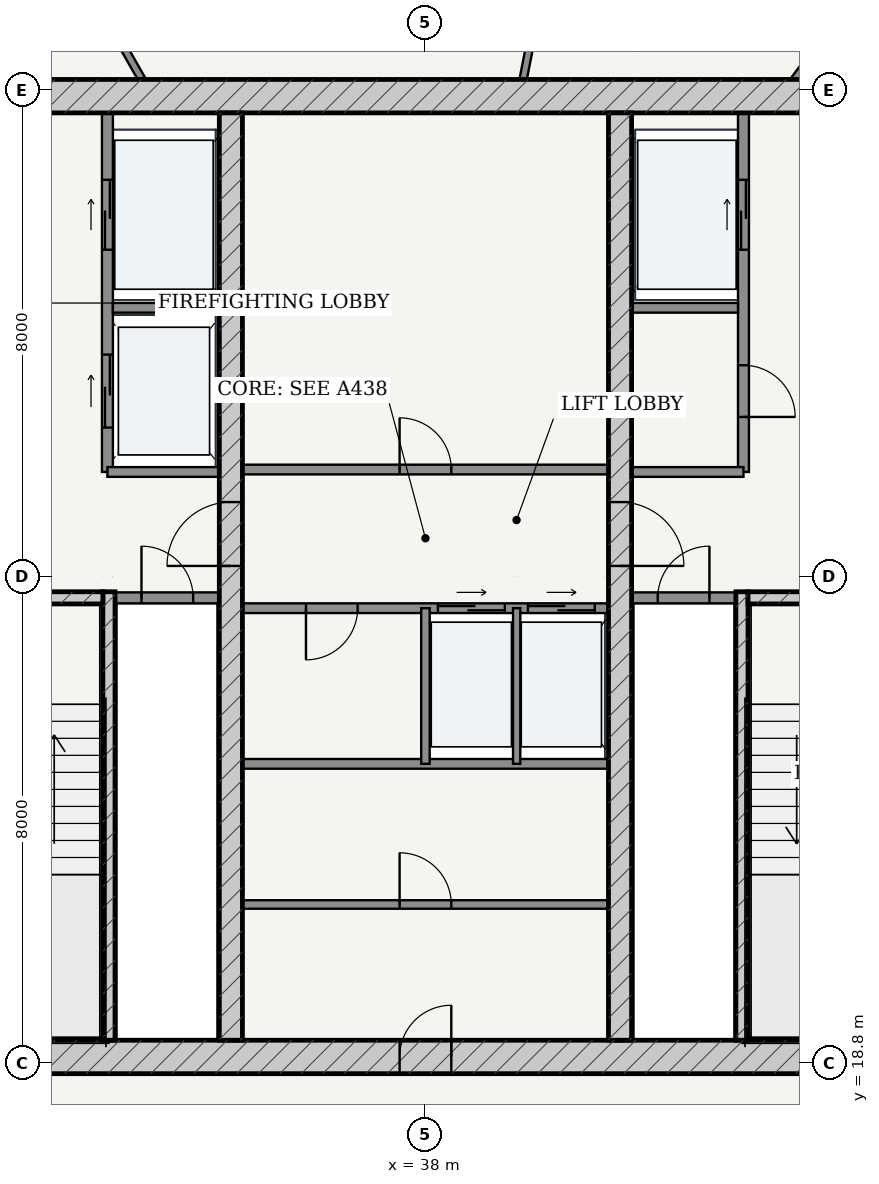
"""IFC4 building model, lengths in metres.
Left out: names, types, materials, properties, quantities, classifications, styles, units other than length and angle.
Written with IfcOpenShell. Run it as: python <this file> out.ifc"""

import sys

from ifc_helpers import new_model, si_unit, direction, frame, frame_2d, origin, place, context, subcontext, project, spatial, rectangle, extrude, source, transform, mapped, element, fill, save


model = new_model("IFC4")
c1 = context("Model", 3, precision=1e-05, world=origin(), true_north=direction((-0.2419218956, 0.970295726276)))
c2 = subcontext(c1, "Body", "Model", "MODEL_VIEW")
j1 = project(units=[si_unit("LENGTHUNIT", "METRE"), si_unit("PLANEANGLEUNIT", "RADIAN")], contexts=[c1])
p1 = place(None, origin())
s1 = spatial("IfcSite", under=j1, at=p1, CompositionType="ELEMENT")
p2 = place(p1, origin())
s2 = spatial("IfcBuilding", under=s1, at=p2, CompositionType="ELEMENT")
p3 = place(p2, frame((0.0, 0.0, 293.2)))
s3 = spatial("IfcBuildingStorey", under=s2, at=p3, CompositionType="ELEMENT", Elevation=293.2)
p4 = place(p3, frame((28.825, 18.9, 0.0), z_axis=(0.0, 0.0, 1.0), x_axis=(1.0, 0.0, 0.0)))
e1 = element("IfcWall", 1, at=p4, inside=s3, PredefinedType="SHEAR", context=c2, shape_type="SweptSolid", body=[
    extrude(rectangle(XDim=18.35, YDim=0.55, at=frame_2d((9.175, 0.0))), origin(), (0.0, 0.0, 1.0), 3.49),
])
p5 = place(p4, frame((8.75, 0.0, 0.0)))
e2 = element("IfcOpeningElement", 2, at=p5, cuts=e1, PredefinedType="OPENING", context=c2, shape_type="SweptSolid", body=[
    extrude(rectangle(XDim=0.85, YDim=2.1, at=frame_2d((0.425, 1.05))), frame((0.0, 0.285, 0.0), z_axis=(0.0, -1.0, 0.0), x_axis=(1.0, 0.0, 0.0)), (0.0, 0.0, 1.0), 0.57),
])
p6 = place(p3, frame((28.825, 34.7, 0.0), z_axis=(0.0, 0.0, 1.0), x_axis=(1.0, 0.0, 0.0)))
e3 = element("IfcWall", 3, at=p6, inside=s3, PredefinedType="SHEAR", context=c2, shape_type="SweptSolid", body=[
    extrude(rectangle(XDim=18.35, YDim=0.55, at=frame_2d((9.175, 0.0))), origin(), (0.0, 0.0, 1.0), 3.49),
])
p7 = place(p3, frame((32.795, 19.175, 0.0), z_axis=(0.0, 0.0, 1.0), x_axis=(0.0, 1.0, 0.0)))
e4 = element("IfcWall", 4, at=p7, inside=s3, PredefinedType="SOLIDWALL", context=c2, shape_type="SweptSolid", body=[
    extrude(rectangle(XDim=7.375, YDim=0.2, at=frame_2d((3.688, 0.0))), origin(), (0.0, 0.0, 1.0), 3.49),
])
p8 = place(p3, frame((29.375, 26.45, 0.0), z_axis=(0.0, 0.0, 1.0), x_axis=(1.0, 0.0, 0.0)))
e5 = element("IfcWall", 5, at=p8, inside=s3, PredefinedType="SOLIDWALL", context=c2, shape_type="SweptSolid", body=[
    extrude(rectangle(XDim=3.32, YDim=0.2, at=frame_2d((1.66, 0.0))), origin(), (0.0, 0.0, 1.0), 3.49),
])
p9 = place(p8, frame((1.185, 0.0, 0.0)))
e6 = element("IfcOpeningElement", 6, at=p9, cuts=e5, PredefinedType="OPENING", context=c2, shape_type="SweptSolid", body=[
    extrude(rectangle(XDim=0.95, YDim=2.15, at=frame_2d((0.475, 1.075))), frame((0.0, 0.11, 0.0), z_axis=(0.0, -1.0, 0.0), x_axis=(1.0, 0.0, 0.0)), (0.0, 0.0, 1.0), 0.22),
])
p10 = place(p3, frame((43.205, 19.175, 0.0), z_axis=(0.0, 0.0, 1.0), x_axis=(0.0, 1.0, 0.0)))
e7 = element("IfcWall", 7, at=p10, inside=s3, PredefinedType="SOLIDWALL", context=c2, shape_type="SweptSolid", body=[
    extrude(rectangle(XDim=7.375, YDim=0.2, at=frame_2d((3.688, 0.0))), origin(), (0.0, 0.0, 1.0), 3.49),
])
p11 = place(p3, frame((43.305, 26.45, 0.0), z_axis=(0.0, 0.0, 1.0), x_axis=(1.0, 0.0, 0.0)))
e8 = element("IfcWall", 8, at=p11, inside=s3, PredefinedType="SOLIDWALL", context=c2, shape_type="SweptSolid", body=[
    extrude(rectangle(XDim=3.32, YDim=0.2, at=frame_2d((1.66, 0.0))), origin(), (0.0, 0.0, 1.0), 3.49),
])
p12 = place(p11, frame((1.185, 0.0, 0.0)))
e9 = element("IfcOpeningElement", 9, at=p12, cuts=e8, PredefinedType="OPENING", context=c2, shape_type="SweptSolid", body=[
    extrude(rectangle(XDim=0.95, YDim=2.15, at=frame_2d((0.475, 1.075))), frame((0.0, 0.11, 0.0), z_axis=(0.0, -1.0, 0.0), x_axis=(1.0, 0.0, 0.0)), (0.0, 0.0, 1.0), 0.22),
])
p13 = place(p3, frame((34.8, 19.175, 0.0), z_axis=(0.0, 0.0, 1.0), x_axis=(0.0, 1.0, 0.0)))
e10 = element("IfcWall", 10, at=p13, inside=s3, PredefinedType="SHEAR", context=c2, shape_type="SweptSolid", body=[
    extrude(rectangle(XDim=15.25, YDim=0.38, at=frame_2d((7.625, 0.0))), origin(), (0.0, 0.0, 1.0), 3.49),
])
p14 = place(p13, frame((7.8, 0.0, 0.0)))
e11 = element("IfcOpeningElement", 11, at=p14, cuts=e10, PredefinedType="OPENING", context=c2, shape_type="SweptSolid", body=[
    extrude(rectangle(XDim=1.05, YDim=2.15, at=frame_2d((0.525, 1.075))), frame((0.0, 0.2, 0.0), z_axis=(0.0, -1.0, 0.0), x_axis=(1.0, 0.0, 0.0)), (0.0, 0.0, 1.0), 0.4),
])
p15 = place(p3, frame((41.2, 19.175, 0.0), z_axis=(0.0, 0.0, 1.0), x_axis=(0.0, 1.0, 0.0)))
e12 = element("IfcWall", 12, at=p15, inside=s3, PredefinedType="SHEAR", context=c2, shape_type="SweptSolid", body=[
    extrude(rectangle(XDim=15.25, YDim=0.38, at=frame_2d((7.625, 0.0))), origin(), (0.0, 0.0, 1.0), 3.49),
])
p16 = place(p15, frame((7.8, 0.0, 0.0)))
e13 = element("IfcOpeningElement", 13, at=p16, cuts=e12, PredefinedType="OPENING", context=c2, shape_type="SweptSolid", body=[
    extrude(rectangle(XDim=1.05, YDim=2.15, at=frame_2d((0.525, 1.075))), frame((0.0, 0.2, 0.0), z_axis=(0.0, -1.0, 0.0), x_axis=(1.0, 0.0, 0.0)), (0.0, 0.0, 1.0), 0.4),
])
p17 = place(p3, frame((32.9, 26.45, 0.0), z_axis=(0.0, 0.0, 1.0), x_axis=(1.0, 0.0, 0.0)))
e14 = element("IfcWall", 14, at=p17, inside=s3, PredefinedType="PARTITIONING", context=c2, shape_type="SweptSolid", body=[
    extrude(rectangle(XDim=1.71, YDim=0.18, at=frame_2d((0.855, 0.0))), origin(), (0.0, 0.0, 1.0), 3.49),
])
p18 = place(p17, frame((0.43, 0.0, 0.0)))
e15 = element("IfcOpeningElement", 15, at=p18, cuts=e14, PredefinedType="OPENING", context=c2, shape_type="SweptSolid", body=[
    extrude(rectangle(XDim=0.85, YDim=2.1, at=frame_2d((0.425, 1.05))), frame((0.0, 0.1, 0.0), z_axis=(0.0, -1.0, 0.0), x_axis=(1.0, 0.0, 0.0)), (0.0, 0.0, 1.0), 0.2),
])
p19 = place(p3, frame((41.39, 26.45, 0.0), z_axis=(0.0, 0.0, 1.0), x_axis=(1.0, 0.0, 0.0)))
e16 = element("IfcWall", 16, at=p19, inside=s3, PredefinedType="PARTITIONING", context=c2, shape_type="SweptSolid", body=[
    extrude(rectangle(XDim=1.71, YDim=0.18, at=frame_2d((0.855, 0.0))), origin(), (0.0, 0.0, 1.0), 3.49),
])
p20 = place(p19, frame((0.43, 0.0, 0.0)))
e17 = element("IfcOpeningElement", 17, at=p20, cuts=e16, PredefinedType="OPENING", context=c2, shape_type="SweptSolid", body=[
    extrude(rectangle(XDim=0.85, YDim=2.1, at=frame_2d((0.425, 1.05))), frame((0.0, 0.1, 0.0), z_axis=(0.0, -1.0, 0.0), x_axis=(1.0, 0.0, 0.0)), (0.0, 0.0, 1.0), 0.2),
])
p21 = place(p3, frame((32.77, 28.52, 0.0), z_axis=(0.0, 0.0, 1.0), x_axis=(0.0, 1.0, 0.0)))
e18 = element("IfcWall", 18, at=p21, inside=s3, PredefinedType="PARTITIONING", context=c2, shape_type="SweptSolid", body=[
    extrude(rectangle(XDim=5.905, YDim=0.18, at=frame_2d((2.953, 0.0))), origin(), (0.0, 0.0, 1.0), 3.49),
])
p22 = place(p21, frame((3.655, 0.0, 0.0)))
e19 = element("IfcOpeningElement", 19, at=p22, cuts=e18, PredefinedType="OPENING", context=c2, shape_type="SweptSolid", body=[
    extrude(rectangle(XDim=1.15, YDim=2.2, at=frame_2d((0.575, 1.1))), frame((0.0, 0.1, 0.0), z_axis=(0.0, -1.0, 0.0), x_axis=(1.0, 0.0, 0.0)), (0.0, 0.0, 1.0), 0.2),
])
p23 = place(p21, frame((0.73, 0.0, 0.0)))
e20 = element("IfcOpeningElement", 20, at=p23, cuts=e18, PredefinedType="OPENING", context=c2, shape_type="SweptSolid", body=[
    extrude(rectangle(XDim=1.2, YDim=2.25, at=frame_2d((0.6, 1.125))), frame((0.0, 0.1, 0.0), z_axis=(0.0, -1.0, 0.0), x_axis=(1.0, 0.0, 0.0)), (0.0, 0.0, 1.0), 0.2),
])
p24 = place(p3, frame((32.86, 31.22, 0.0), z_axis=(0.0, 0.0, 1.0), x_axis=(1.0, 0.0, 0.0)))
e21 = element("IfcWall", 21, at=p24, inside=s3, PredefinedType="PARTITIONING", context=c2, shape_type="SweptSolid", body=[
    extrude(rectangle(XDim=1.75, YDim=0.16, at=frame_2d((0.875, 0.0))), origin(), (0.0, 0.0, 1.0), 3.49),
])
p25 = place(p3, frame((32.77, 28.52, 0.0), z_axis=(0.0, 0.0, 1.0), x_axis=(1.0, 0.0, 0.0)))
e22 = element("IfcWall", 22, at=p25, inside=s3, PredefinedType="PARTITIONING", context=c2, shape_type="SweptSolid", body=[
    extrude(rectangle(XDim=1.84, YDim=0.16, at=frame_2d((0.92, 0.0))), origin(), (0.0, 0.0, 1.0), 3.49),
])
p26 = place(p3, frame((43.23, 28.52, 0.0), z_axis=(0.0, 0.0, 1.0), x_axis=(0.0, 1.0, 0.0)))
e23 = element("IfcWall", 23, at=p26, inside=s3, PredefinedType="PARTITIONING", context=c2, shape_type="SweptSolid", body=[
    extrude(rectangle(XDim=5.905, YDim=0.18, at=frame_2d((2.953, 0.0))), origin(), (0.0, 0.0, 1.0), 3.49),
])
p27 = place(p26, frame((0.905, 0.0, 0.0)))
e24 = element("IfcOpeningElement", 24, at=p27, cuts=e23, PredefinedType="OPENING", context=c2, shape_type="SweptSolid", body=[
    extrude(rectangle(XDim=0.85, YDim=2.1, at=frame_2d((0.425, 1.05))), frame((0.0, 0.1, 0.0), z_axis=(0.0, -1.0, 0.0), x_axis=(1.0, 0.0, 0.0)), (0.0, 0.0, 1.0), 0.2),
])
p28 = place(p26, frame((3.655, 0.0, 0.0)))
e25 = element("IfcOpeningElement", 25, at=p28, cuts=e23, PredefinedType="OPENING", context=c2, shape_type="SweptSolid", body=[
    extrude(rectangle(XDim=1.15, YDim=2.2, at=frame_2d((0.575, 1.1))), frame((0.0, 0.1, 0.0), z_axis=(0.0, -1.0, 0.0), x_axis=(1.0, 0.0, 0.0)), (0.0, 0.0, 1.0), 0.2),
])
p29 = place(p3, frame((41.39, 31.22, 0.0), z_axis=(0.0, 0.0, 1.0), x_axis=(1.0, 0.0, 0.0)))
e26 = element("IfcWall", 26, at=p29, inside=s3, PredefinedType="PARTITIONING", context=c2, shape_type="SweptSolid", body=[
    extrude(rectangle(XDim=1.75, YDim=0.16, at=frame_2d((0.875, 0.0))), origin(), (0.0, 0.0, 1.0), 3.49),
])
p30 = place(p3, frame((41.39, 28.52, 0.0), z_axis=(0.0, 0.0, 1.0), x_axis=(1.0, 0.0, 0.0)))
e27 = element("IfcWall", 27, at=p30, inside=s3, PredefinedType="PARTITIONING", context=c2, shape_type="SweptSolid", body=[
    extrude(rectangle(XDim=1.84, YDim=0.16, at=frame_2d((0.92, 0.0))), origin(), (0.0, 0.0, 1.0), 3.49),
])
p31 = place(p3, frame((34.99, 28.56, 0.0), z_axis=(0.0, 0.0, 1.0), x_axis=(1.0, 0.0, 0.0)))
e28 = element("IfcWall", 28, at=p31, inside=s3, PredefinedType="PARTITIONING", context=c2, shape_type="SweptSolid", body=[
    extrude(rectangle(XDim=6.02, YDim=0.16, at=frame_2d((3.01, 0.0))), origin(), (0.0, 0.0, 1.0), 3.49),
])
p32 = place(p31, frame((2.585, 0.0, 0.0)))
e29 = element("IfcOpeningElement", 29, at=p32, cuts=e28, PredefinedType="OPENING", context=c2, shape_type="SweptSolid", body=[
    extrude(rectangle(XDim=0.85, YDim=2.1, at=frame_2d((0.425, 1.05))), frame((0.0, 0.09, 0.0), z_axis=(0.0, -1.0, 0.0), x_axis=(1.0, 0.0, 0.0)), (0.0, 0.0, 1.0), 0.18),
])
p33 = place(p3, frame((34.99, 26.28, 0.0), z_axis=(0.0, 0.0, 1.0), x_axis=(1.0, 0.0, 0.0)))
e30 = element("IfcWall", 30, at=p33, inside=s3, PredefinedType="PARTITIONING", context=c2, shape_type="SweptSolid", body=[
    extrude(rectangle(XDim=6.02, YDim=0.16, at=frame_2d((3.01, 0.0))), origin(), (0.0, 0.0, 1.0), 3.49),
])
p34 = place(p33, frame((1.045, 0.0, 0.0)))
e31 = element("IfcOpeningElement", 31, at=p34, cuts=e30, PredefinedType="OPENING", context=c2, shape_type="SweptSolid", body=[
    extrude(rectangle(XDim=0.85, YDim=2.1, at=frame_2d((0.425, 1.05))), frame((0.0, 0.09, 0.0), z_axis=(0.0, -1.0, 0.0), x_axis=(1.0, 0.0, 0.0)), (0.0, 0.0, 1.0), 0.18),
])
p35 = place(p33, frame((3.215, 0.0, 0.0)))
e32 = element("IfcOpeningElement", 32, at=p35, cuts=e30, PredefinedType="OPENING", context=c2, shape_type="SweptSolid", body=[
    extrude(rectangle(XDim=1.1, YDim=2.2, at=frame_2d((0.55, 1.1))), frame((0.0, 0.09, 0.0), z_axis=(0.0, -1.0, 0.0), x_axis=(1.0, 0.0, 0.0)), (0.0, 0.0, 1.0), 0.18),
])
p36 = place(p33, frame((4.695, 0.0, 0.0)))
e33 = element("IfcOpeningElement", 33, at=p36, cuts=e30, PredefinedType="OPENING", context=c2, shape_type="SweptSolid", body=[
    extrude(rectangle(XDim=1.1, YDim=2.2, at=frame_2d((0.55, 1.1))), frame((0.0, 0.09, 0.0), z_axis=(0.0, -1.0, 0.0), x_axis=(1.0, 0.0, 0.0)), (0.0, 0.0, 1.0), 0.18),
])
p37 = place(p3, frame((34.99, 23.72, 0.0), z_axis=(0.0, 0.0, 1.0), x_axis=(1.0, 0.0, 0.0)))
e34 = element("IfcWall", 34, at=p37, inside=s3, PredefinedType="PARTITIONING", context=c2, shape_type="SweptSolid", body=[
    extrude(rectangle(XDim=6.02, YDim=0.16, at=frame_2d((3.01, 0.0))), origin(), (0.0, 0.0, 1.0), 3.49),
])
p38 = place(p3, frame((38.0, 23.72, 0.0), z_axis=(0.0, 0.0, 1.0), x_axis=(0.0, 1.0, 0.0)))
e35 = element("IfcWall", 35, at=p38, inside=s3, PredefinedType="PARTITIONING", context=c2, shape_type="SweptSolid", body=[
    extrude(rectangle(XDim=2.56, YDim=0.14, at=frame_2d((1.28, 0.0))), origin(), (0.0, 0.0, 1.0), 3.49),
])
p39 = place(p3, frame((39.5, 23.72, 0.0), z_axis=(0.0, 0.0, 1.0), x_axis=(0.0, 1.0, 0.0)))
e36 = element("IfcWall", 36, at=p39, inside=s3, PredefinedType="PARTITIONING", context=c2, shape_type="SweptSolid", body=[
    extrude(rectangle(XDim=2.56, YDim=0.12, at=frame_2d((1.28, 0.0))), origin(), (0.0, 0.0, 1.0), 3.49),
])
p40 = place(p3, frame((34.99, 21.407, 0.0), z_axis=(0.0, 0.0, 1.0), x_axis=(1.0, 0.0, 0.0)))
e37 = element("IfcWall", 37, at=p40, inside=s3, PredefinedType="PARTITIONING", context=c2, shape_type="SweptSolid", body=[
    extrude(rectangle(XDim=6.02, YDim=0.14, at=frame_2d((3.01, 0.0))), origin(), (0.0, 0.0, 1.0), 3.49),
])
p41 = place(p40, frame((2.585, 0.0, 0.0)))
e38 = element("IfcOpeningElement", 38, at=p41, cuts=e37, PredefinedType="OPENING", context=c2, shape_type="SweptSolid", body=[
    extrude(rectangle(XDim=0.85, YDim=2.1, at=frame_2d((0.425, 1.05))), frame((0.0, 0.08, 0.0), z_axis=(0.0, -1.0, 0.0), x_axis=(1.0, 0.0, 0.0)), (0.0, 0.0, 1.0), 0.16),
])
p42 = place(p3, frame((44.07, 34.977, 0.0), z_axis=(0.0, 0.0, 1.0), x_axis=(0.596034582173, 0.802958764106, 0.0)))
e39 = element("IfcWall", 39, at=p42, inside=s3, PredefinedType="PARTITIONING", context=c2, shape_type="SweptSolid", body=[
    extrude(rectangle(XDim=3.573, YDim=0.12, at=frame_2d((1.786, 0.0))), origin(), (0.0, 0.0, 1.0), 3.49),
])
p43 = place(p42, frame((1.336, 0.0, 0.0)))
e40 = element("IfcOpeningElement", 40, at=p43, cuts=e39, PredefinedType="OPENING", context=c2, shape_type="SweptSolid", body=[
    extrude(rectangle(XDim=0.9, YDim=2.15, at=frame_2d((0.45, 1.075))), frame((0.0, 0.07, 0.0), z_axis=(0.0, -1.0, 0.0), x_axis=(1.0, 0.0, 0.0)), (0.0, 0.0, 1.0), 0.14),
])
p44 = place(p3, frame((39.607, 34.977, 0.0), z_axis=(0.0, 0.0, 1.0), x_axis=(0.192841890083, 0.981229843324, 0.0)))
e41 = element("IfcWall", 41, at=p44, inside=s3, PredefinedType="PARTITIONING", context=c2, shape_type="SweptSolid", body=[
    extrude(rectangle(XDim=2.912, YDim=0.12, at=frame_2d((1.456, 0.0))), origin(), (0.0, 0.0, 1.0), 2.575),
])
p45 = place(p44, frame((1.006, 0.0, 0.0)))
e42 = element("IfcOpeningElement", 42, at=p45, cuts=e41, PredefinedType="OPENING", context=c2, shape_type="SweptSolid", body=[
    extrude(rectangle(XDim=0.9, YDim=2.15, at=frame_2d((0.45, 1.075))), frame((0.0, 0.07, 0.0), z_axis=(0.0, -1.0, 0.0), x_axis=(1.0, 0.0, 0.0)), (0.0, 0.0, 1.0), 0.14),
])
p46 = place(p3, frame((33.336, 34.977, 0.0), z_axis=(0.0, 0.0, 1.0), x_axis=(-0.495413156231, 0.86865747256, 0.0)))
e43 = element("IfcWall", 43, at=p46, inside=s3, PredefinedType="PARTITIONING", context=c2, shape_type="SweptSolid", body=[
    extrude(rectangle(XDim=3.297, YDim=0.12, at=frame_2d((1.649, 0.0))), origin(), (0.0, 0.0, 1.0), 3.49),
])
p47 = place(p46, frame((1.199, 0.0, 0.0)))
e44 = element("IfcOpeningElement", 44, at=p47, cuts=e43, PredefinedType="OPENING", context=c2, shape_type="SweptSolid", body=[
    extrude(rectangle(XDim=0.9, YDim=2.15, at=frame_2d((0.45, 1.075))), frame((0.0, 0.07, 0.0), z_axis=(0.0, -1.0, 0.0), x_axis=(1.0, 0.0, 0.0)), (0.0, 0.0, 1.0), 0.14),
])
m1 = source(origin(), c2, "Body", "SweptSolid", [
    extrude(rectangle(XDim=1.05, YDim=2.15, at=frame_2d((0.525, 1.075))), frame((0.0, 0.025, 0.0), z_axis=(0.0, -1.0, 0.0), x_axis=(1.0, 0.0, 0.0)), (0.0, 0.0, 1.0), 0.05),
])
p48 = place(p14, origin())
e45 = element("IfcDoor", 45, at=p48, inside=s3, OperationType="SINGLE_SWING_LEFT", PredefinedType="DOOR", context=c2, shape_type="MappedRepresentation", body=[
    mapped(m1, transform((0.0, 0.0, 0.0), scale=1.0)),
])
fill(e11, e45)
p49 = place(p16, frame((1.05, 0.0, 0.0), z_axis=(0.0, 0.0, 1.0), x_axis=(-1.0, 0.0, 0.0)))
e46 = element("IfcDoor", 46, at=p49, inside=s3, OperationType="SINGLE_SWING_RIGHT", PredefinedType="DOOR", context=c2, shape_type="MappedRepresentation", body=[
    mapped(m1, transform((0.0, 0.0, 0.0), scale=1.0)),
])
fill(e13, e46)
m2 = source(origin(), c2, "Body", "SweptSolid", [
    extrude(rectangle(XDim=0.85, YDim=2.1, at=frame_2d((0.425, 1.05))), frame((0.0, 0.025, 0.0), z_axis=(0.0, -1.0, 0.0), x_axis=(1.0, 0.0, 0.0)), (0.0, 0.0, 1.0), 0.05),
])
p50 = place(p18, origin())
e47 = element("IfcDoor", 47, at=p50, inside=s3, OperationType="SINGLE_SWING_LEFT", PredefinedType="DOOR", context=c2, shape_type="MappedRepresentation", body=[
    mapped(m2, transform((0.0, 0.0, 0.0), scale=1.0)),
])
fill(e15, e47)
p51 = place(p20, origin())
e48 = element("IfcDoor", 48, at=p51, inside=s3, OperationType="SINGLE_SWING_RIGHT", PredefinedType="DOOR", context=c2, shape_type="MappedRepresentation", body=[
    mapped(m2, transform((0.0, 0.0, 0.0), scale=1.0)),
])
fill(e17, e48)
p52 = place(p27, frame((0.85, 0.0, 0.0), z_axis=(0.0, 0.0, 1.0), x_axis=(-1.0, 0.0, 0.0)))
e49 = element("IfcDoor", 49, at=p52, inside=s3, OperationType="SINGLE_SWING_RIGHT", PredefinedType="DOOR", context=c2, shape_type="MappedRepresentation", body=[
    mapped(m2, transform((0.0, 0.0, 0.0), scale=1.0)),
])
fill(e24, e49)
p53 = place(p32, origin())
e50 = element("IfcDoor", 50, at=p53, inside=s3, OperationType="SINGLE_SWING_LEFT", PredefinedType="DOOR", context=c2, shape_type="MappedRepresentation", body=[
    mapped(m2, transform((0.0, 0.0, 0.0), scale=1.0)),
])
fill(e29, e50)
p54 = place(p34, frame((0.85, 0.0, 0.0), z_axis=(0.0, 0.0, 1.0), x_axis=(-1.0, 0.0, 0.0)))
e51 = element("IfcDoor", 51, at=p54, inside=s3, OperationType="SINGLE_SWING_RIGHT", PredefinedType="DOOR", context=c2, shape_type="MappedRepresentation", body=[
    mapped(m2, transform((0.0, 0.0, 0.0), scale=1.0)),
])
fill(e31, e51)
p55 = place(p5, origin())
e52 = element("IfcDoor", 52, at=p55, inside=s3, OperationType="SINGLE_SWING_RIGHT", PredefinedType="DOOR", context=c2, shape_type="MappedRepresentation", body=[
    mapped(m2, transform((0.0, 0.0, 0.0), scale=1.0)),
])
fill(e2, e52)
p56 = place(p41, origin())
e53 = element("IfcDoor", 53, at=p56, inside=s3, OperationType="SINGLE_SWING_LEFT", PredefinedType="DOOR", context=c2, shape_type="MappedRepresentation", body=[
    mapped(m2, transform((0.0, 0.0, 0.0), scale=1.0)),
])
fill(e38, e53)
m3 = source(origin(), c2, "Body", "SweptSolid", [
    extrude(rectangle(XDim=1.15, YDim=2.2, at=frame_2d((0.575, 1.1))), frame((0.0, 0.025, 0.0), z_axis=(0.0, -1.0, 0.0), x_axis=(1.0, 0.0, 0.0)), (0.0, 0.0, 1.0), 0.05),
])
p57 = place(p22, origin())
e54 = element("IfcDoor", 54, at=p57, inside=s3, OperationType="DOUBLE_DOOR_SLIDING", PredefinedType="DOOR", context=c2, shape_type="MappedRepresentation", body=[
    mapped(m3, transform((0.0, 0.0, 0.0), scale=1.0)),
])
fill(e19, e54)
p58 = place(p28, origin())
e55 = element("IfcDoor", 55, at=p58, inside=s3, OperationType="DOUBLE_DOOR_SLIDING", PredefinedType="DOOR", context=c2, shape_type="MappedRepresentation", body=[
    mapped(m3, transform((0.0, 0.0, 0.0), scale=1.0)),
])
fill(e25, e55)
m4 = source(origin(), c2, "Body", "SweptSolid", [
    extrude(rectangle(XDim=1.2, YDim=2.25, at=frame_2d((0.6, 1.125))), frame((0.0, 0.025, 0.0), z_axis=(0.0, -1.0, 0.0), x_axis=(1.0, 0.0, 0.0)), (0.0, 0.0, 1.0), 0.05),
])
p59 = place(p23, origin())
e56 = element("IfcDoor", 56, at=p59, inside=s3, OperationType="DOUBLE_DOOR_SLIDING", PredefinedType="DOOR", context=c2, shape_type="MappedRepresentation", body=[
    mapped(m4, transform((0.0, 0.0, 0.0), scale=1.0)),
])
fill(e20, e56)
m5 = source(origin(), c2, "Body", "SweptSolid", [
    extrude(rectangle(XDim=1.1, YDim=2.2, at=frame_2d((0.55, 1.1))), frame((0.0, 0.025, 0.0), z_axis=(0.0, -1.0, 0.0), x_axis=(1.0, 0.0, 0.0)), (0.0, 0.0, 1.0), 0.05),
])
p60 = place(p35, origin())
e57 = element("IfcDoor", 57, at=p60, inside=s3, OperationType="DOUBLE_DOOR_SLIDING", PredefinedType="DOOR", context=c2, shape_type="MappedRepresentation", body=[
    mapped(m5, transform((0.0, 0.0, 0.0), scale=1.0)),
])
fill(e32, e57)
p61 = place(p36, origin())
e58 = element("IfcDoor", 58, at=p61, inside=s3, OperationType="DOUBLE_DOOR_SLIDING", PredefinedType="DOOR", context=c2, shape_type="MappedRepresentation", body=[
    mapped(m5, transform((0.0, 0.0, 0.0), scale=1.0)),
])
fill(e33, e58)
save(model, sys.argv[1])
